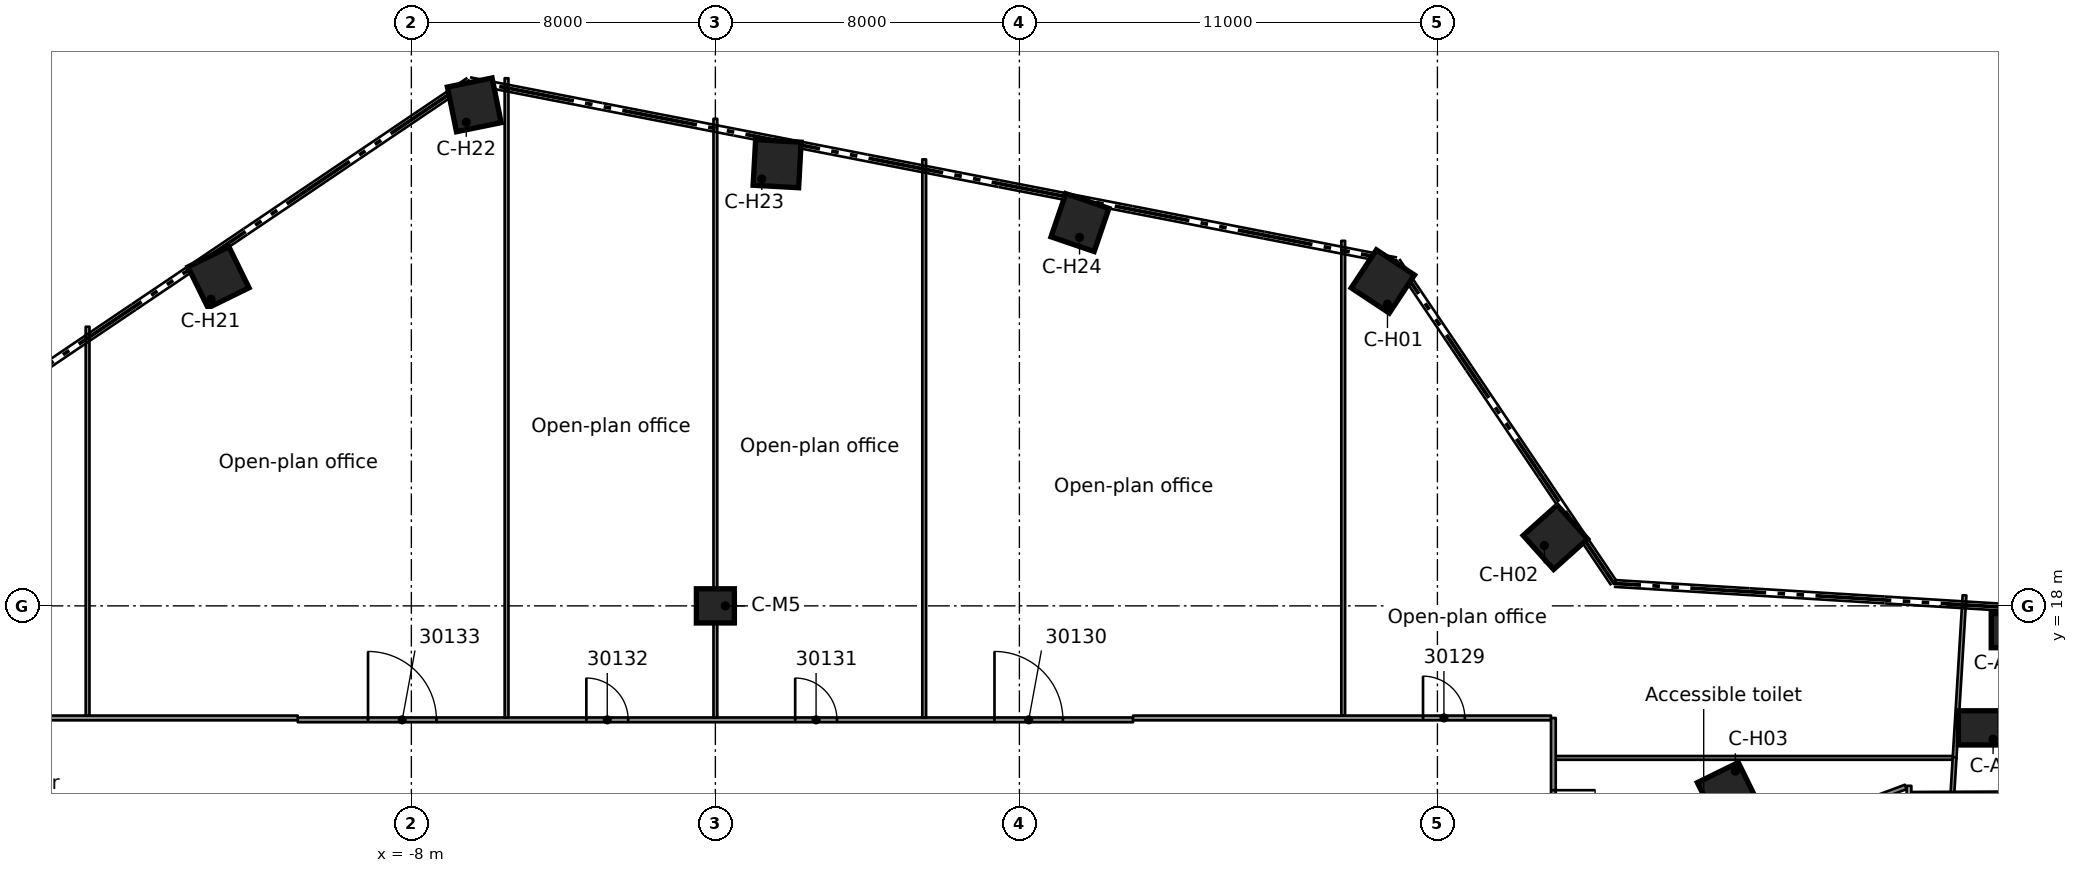
"""IFC4 building model, lengths in metres.
Left out: names, types, materials, properties, quantities, classifications, styles, units other than length and angle.
Written with IfcOpenShell. Run it as: python <this file> out.ifc"""

import sys

from ifc_helpers import new_model, si_unit, direction, frame, frame_2d, origin, origin_2d, place, context, subcontext, project, spatial, rectangle, extrude, element, fill, save


model = new_model("IFC4")
c1 = context("Model", 3, precision=1e-05, world=origin(), true_north=direction((0.0, 1.0)))
c2 = subcontext(c1, "Body", "Model", "MODEL_VIEW")
j1 = project(units=[si_unit("LENGTHUNIT", "METRE"), si_unit("PLANEANGLEUNIT", "RADIAN")], contexts=[c1])
p1 = place(None, origin())
s1 = spatial("IfcSite", under=j1, at=p1, CompositionType="ELEMENT")
p2 = place(p1, origin())
s2 = spatial("IfcBuilding", under=s1, at=p2, CompositionType="ELEMENT")
p3 = place(p2, frame((0.0, 0.0, 152.6)))
s3 = spatial("IfcBuildingStorey", under=s2, at=p3, CompositionType="ELEMENT", Elevation=152.6)
for number, where, z_axis, x_axis in (
    (1, (34.123, 17.349, 0.0), (0.0, 0.0, 1.0), (1.0, 0.0, 0.0)),
    (2, (33.258, 14.79, 0.0), (0.0, 0.0, 1.0), (1.0, 0.0, 0.0)),
):
    element("IfcColumn", number, at=place(p3, frame(where, z_axis=z_axis, x_axis=x_axis)), inside=s3, PredefinedType="COLUMN", context=c2, shape_type="SweptSolid", body=[
        extrude(rectangle(XDim=1.1, YDim=0.9, at=origin_2d()), origin(), (0.0, 0.0, 1.0), 3.5),
    ])
for number, where, z_axis, x_axis in (
    (3, (17.564, 26.536, 0.0), (0.0, 0.0, 1.0), (0.552, 0.834, 0.0)),
    (4, (22.104, 19.806, 0.0), (0.0, 0.0, 1.0), (0.745, 0.667, 0.0)),
    (5, (26.644, 13.075, 0.0), (0.0, 0.0, 1.0), (0.898, 0.441, 0.0)),
    (6, (-13.075, 26.644, 0.0), (0.0, 0.0, 1.0), (-0.441, 0.898, 0.0)),
    (7, (-6.344, 31.183, 0.0), (0.0, 0.0, 1.0), (-0.199, 0.98, 0.0)),
    (8, (1.625, 29.634, 0.0), (0.0, 0.0, 1.0), (0.055, 0.998, 0.0)),
    (9, (9.594, 28.085, 0.0), (0.0, 0.0, 1.0), (0.323, 0.946, 0.0)),
):
    element("IfcColumn", number, at=place(p3, frame(where, z_axis=z_axis, x_axis=x_axis)), inside=s3, PredefinedType="COLUMN", context=c2, shape_type="SweptSolid", body=[
        extrude(rectangle(XDim=1.2, YDim=1.2, at=origin_2d()), origin(), (0.0, 0.0, 1.0), 3.5),
    ])
p4 = place(p3, frame((0.0, 18.0, 0.0), z_axis=(0.0, 0.0, 1.0), x_axis=(1.0, 0.0, 0.0)))
e10 = element("IfcColumn", 10, at=p4, inside=s3, PredefinedType="COLUMN", context=c2, shape_type="SweptSolid", body=[
    extrude(rectangle(XDim=1.0, YDim=0.9, at=origin_2d()), origin(), (0.0, 0.0, 1.0), 3.5),
])
p5 = place(p3, frame((31.471, 13.041, 0.0), z_axis=(0.0, 0.0, 1.0), x_axis=(0.999990255084, 0.004414718129, 0.0)))
e11 = element("IfcWall", 11, at=p5, inside=s3, PredefinedType="PARTITIONING", context=c2, shape_type="SweptSolid", body=[
    extrude(rectangle(XDim=8.627, YDim=0.125, at=frame_2d((4.313, 0.0))), origin(), (0.0, 0.0, 1.0), 3.08),
])
p6 = place(p3, frame((22.113, 14.0, 0.0), z_axis=(0.0, 0.0, 1.0), x_axis=(1.0, 0.0, 0.0)))
e12 = element("IfcWall", 12, at=p6, inside=s3, PredefinedType="PARTITIONING", context=c2, shape_type="SweptSolid", body=[
    extrude(rectangle(XDim=10.446, YDim=0.1, at=frame_2d((5.223, 0.0))), origin(), (0.0, 0.0, 1.0), 3.08),
])
p7 = place(p3, frame((-10.99, 15.001, 0.0), z_axis=(0.0, 0.0, 1.0), x_axis=(1.0, 0.0, 0.0)))
e13 = element("IfcWall", 13, at=p7, inside=s3, PredefinedType="PARTITIONING", context=c2, shape_type="SweptSolid", body=[
    extrude(rectangle(XDim=21.98, YDim=0.125, at=frame_2d((10.99, 0.0))), origin(), (0.0, 0.0, 1.0), 3.08),
])
p8 = place(p7, frame((18.335, 0.0, 0.0)))
e14 = element("IfcOpeningElement", 14, at=p8, cuts=e13, PredefinedType="OPENING", context=c2, shape_type="SweptSolid", body=[
    extrude(rectangle(XDim=1.8, YDim=2.1, at=frame_2d((0.9, 1.05))), frame((0.0, 0.073, 0.0), z_axis=(0.0, -1.0, 0.0), x_axis=(1.0, 0.0, 0.0)), (0.0, 0.0, 1.0), 0.145),
])
p9 = place(p7, frame((13.09, 0.0, 0.0)))
e15 = element("IfcOpeningElement", 15, at=p9, cuts=e13, PredefinedType="OPENING", context=c2, shape_type="SweptSolid", body=[
    extrude(rectangle(XDim=1.1, YDim=2.1, at=frame_2d((0.55, 1.05))), frame((0.0, 0.073, 0.0), z_axis=(0.0, -1.0, 0.0), x_axis=(1.0, 0.0, 0.0)), (0.0, 0.0, 1.0), 0.145),
])
p10 = place(p7, frame((7.595, 0.0, 0.0)))
e16 = element("IfcOpeningElement", 16, at=p10, cuts=e13, PredefinedType="OPENING", context=c2, shape_type="SweptSolid", body=[
    extrude(rectangle(XDim=1.1, YDim=2.1, at=frame_2d((0.55, 1.05))), frame((0.0, 0.073, 0.0), z_axis=(0.0, -1.0, 0.0), x_axis=(1.0, 0.0, 0.0)), (0.0, 0.0, 1.0), 0.145),
])
p11 = place(p7, frame((1.85, 0.0, 0.0)))
e17 = element("IfcOpeningElement", 17, at=p11, cuts=e13, PredefinedType="OPENING", context=c2, shape_type="SweptSolid", body=[
    extrude(rectangle(XDim=1.8, YDim=2.1, at=frame_2d((0.9, 1.05))), frame((0.0, 0.073, 0.0), z_axis=(0.0, -1.0, 0.0), x_axis=(1.0, 0.0, 0.0)), (0.0, 0.0, 1.0), 0.145),
])
p12 = place(p3, frame((-21.988, 15.051, 0.0), z_axis=(0.0, 0.0, 1.0), x_axis=(1.0, 0.0, 0.0)))
e18 = element("IfcWall", 18, at=p12, inside=s3, PredefinedType="PARTITIONING", context=c2, shape_type="SweptSolid", body=[
    extrude(rectangle(XDim=10.997, YDim=0.125, at=frame_2d((5.499, 0.0))), origin(), (0.0, 0.0, 1.0), 3.08),
])
p13 = place(p12, frame((2.038, 0.0, 0.0)))
e19 = element("IfcOpeningElement", 19, at=p13, cuts=e18, PredefinedType="OPENING", context=c2, shape_type="SweptSolid", body=[
    extrude(rectangle(XDim=1.1, YDim=2.1, at=frame_2d((0.55, 1.05))), frame((0.0, 0.073, 0.0), z_axis=(0.0, -1.0, 0.0), x_axis=(1.0, 0.0, 0.0)), (0.0, 0.0, 1.0), 0.145),
])
p14 = place(p3, frame((10.991, 15.051, 0.0), z_axis=(0.0, 0.0, 1.0), x_axis=(1.0, 0.0, 0.0)))
e20 = element("IfcWall", 20, at=p14, inside=s3, PredefinedType="PARTITIONING", context=c2, shape_type="SweptSolid", body=[
    extrude(rectangle(XDim=10.997, YDim=0.125, at=frame_2d((5.499, 0.0))), origin(), (0.0, 0.0, 1.0), 3.08),
])
p15 = place(p14, frame((7.63, 0.0, 0.0)))
e21 = element("IfcOpeningElement", 21, at=p15, cuts=e20, PredefinedType="OPENING", context=c2, shape_type="SweptSolid", body=[
    extrude(rectangle(XDim=1.1, YDim=2.1, at=frame_2d((0.55, 1.05))), frame((0.0, 0.073, 0.0), z_axis=(0.0, -1.0, 0.0), x_axis=(1.0, 0.0, 0.0)), (0.0, 0.0, 1.0), 0.145),
])
p16 = place(p3, frame((25.742, 11.158, 0.0), z_axis=(0.0, 0.0, 1.0), x_axis=(0.937195672542, 0.348804058705, 0.0)))
e22 = element("IfcWall", 22, at=p16, inside=s3, PredefinedType="PARTITIONING", context=c2, shape_type="SweptSolid", body=[
    extrude(rectangle(XDim=5.955, YDim=0.125, at=frame_2d((2.978, 0.0))), origin(), (0.0, 0.0, 1.0), 3.08),
])
p17 = place(p3, frame((32.608, 13.985, 0.0), z_axis=(0.0, 0.0, 1.0), x_axis=(0.060978462691, 0.998139082036, 0.0)))
e23 = element("IfcWall", 23, at=p17, inside=s3, PredefinedType="PARTITIONING", context=c2, shape_type="SweptSolid", body=[
    extrude(rectangle(XDim=4.3, YDim=0.1, at=frame_2d((2.15, 0.0))), origin(), (0.0, 0.0, 1.0), 3.08),
])
p18 = place(p3, frame((32.554, 13.103, 0.0), z_axis=(0.0, 0.0, 1.0), x_axis=(0.061463226288, 0.998109348626, 0.0)))
e24 = element("IfcWall", 24, at=p18, inside=s3, PredefinedType="PARTITIONING", context=c2, shape_type="SweptSolid", body=[
    extrude(rectangle(XDim=0.914, YDim=0.1, at=frame_2d((0.457, 0.0))), origin(), (0.0, 0.0, 1.0), 3.08),
])
p19 = place(p3, frame((31.409, 13.041, 0.0), z_axis=(0.0, 0.0, 1.0), x_axis=(0.0, 1.0, 0.0)))
e25 = element("IfcWall", 25, at=p19, inside=s3, PredefinedType="PARTITIONING", context=c2, shape_type="SweptSolid", body=[
    extrude(rectangle(XDim=0.224, YDim=0.125, at=frame_2d((0.112, 0.0))), origin(), (0.0, 0.0, 1.0), 3.08),
])
p20 = place(p3, frame((22.051, 15.05, 0.0), z_axis=(0.0, 0.0, 1.0), x_axis=(0.0, -1.0, 0.0)))
e26 = element("IfcWall", 26, at=p20, inside=s3, PredefinedType="PARTITIONING", context=c2, shape_type="SweptSolid", body=[
    extrude(rectangle(XDim=3.89, YDim=0.125, at=frame_2d((1.945, 0.0))), origin(), (0.0, 0.0, 1.0), 3.08),
])
p21 = place(p20, frame((1.9, 0.0, 0.0)))
e27 = element("IfcOpeningElement", 27, at=p21, cuts=e26, PredefinedType="OPENING", context=c2, shape_type="SweptSolid", body=[
    extrude(rectangle(XDim=1.1, YDim=2.1, at=frame_2d((0.55, 1.05))), frame((0.0, 0.073, 0.0), z_axis=(0.0, -1.0, 0.0), x_axis=(1.0, 0.0, 0.0)), (0.0, 0.0, 1.0), 0.145),
])
p22 = place(p3, frame((16.521, 15.114, 0.0), z_axis=(0.0, 0.0, 1.0), x_axis=(0.0, 1.0, 0.0)))
e28 = element("IfcWall", 28, at=p22, inside=s3, PredefinedType="PARTITIONING", context=c2, shape_type="SweptSolid", body=[
    extrude(rectangle(XDim=12.491, YDim=0.1, at=frame_2d((6.246, 0.0))), origin(), (0.0, 0.0, 1.0), 3.08),
])
p23 = place(p3, frame((5.495, 15.063, 0.0), z_axis=(0.0, 0.0, 1.0), x_axis=(0.0, 1.0, 0.0)))
e29 = element("IfcWall", 29, at=p23, inside=s3, PredefinedType="PARTITIONING", context=c2, shape_type="SweptSolid", body=[
    extrude(rectangle(XDim=14.685, YDim=0.1, at=frame_2d((7.343, 0.0))), origin(), (0.0, 0.0, 1.0), 3.08),
])
p24 = place(p3, frame((0.0, 15.063, 0.0), z_axis=(0.0, 0.0, 1.0), x_axis=(0.0, 1.0, 0.0)))
e30 = element("IfcWall", 30, at=p24, inside=s3, PredefinedType="PARTITIONING", context=c2, shape_type="SweptSolid", body=[
    extrude(rectangle(XDim=15.753, YDim=0.1, at=frame_2d((7.876, 0.0))), origin(), (0.0, 0.0, 1.0), 3.08),
])
p25 = place(p3, frame((-5.495, 15.063, 0.0), z_axis=(0.0, 0.0, 1.0), x_axis=(0.0, 1.0, 0.0)))
e31 = element("IfcWall", 31, at=p25, inside=s3, PredefinedType="PARTITIONING", context=c2, shape_type="SweptSolid", body=[
    extrude(rectangle(XDim=16.821, YDim=0.1, at=frame_2d((8.411, 0.0))), origin(), (0.0, 0.0, 1.0), 3.08),
])
p26 = place(p3, frame((-16.52, 15.114, 0.0), z_axis=(0.0, 0.0, 1.0), x_axis=(0.0, 1.0, 0.0)))
e32 = element("IfcWall", 32, at=p26, inside=s3, PredefinedType="PARTITIONING", context=c2, shape_type="SweptSolid", body=[
    extrude(rectangle(XDim=10.231, YDim=0.1, at=frame_2d((5.115, 0.0))), origin(), (0.0, 0.0, 1.0), 3.08),
])
p27 = place(p21, origin())
e33 = element("IfcDoor", 33, at=p27, inside=s3, OperationType="SINGLE_SWING_RIGHT", PredefinedType="DOOR", context=c2, shape_type="SweptSolid", body=[
    extrude(rectangle(XDim=1.1, YDim=2.1, at=frame_2d((0.55, 1.05))), frame((0.0, 0.025, 0.0), z_axis=(0.0, -1.0, 0.0), x_axis=(1.0, 0.0, 0.0)), (0.0, 0.0, 1.0), 0.05),
])
fill(e27, e33)
p28 = place(p15, origin())
e34 = element("IfcDoor", 34, at=p28, inside=s3, OperationType="SINGLE_SWING_RIGHT", PredefinedType="DOOR", context=c2, shape_type="SweptSolid", body=[
    extrude(rectangle(XDim=1.1, YDim=2.1, at=frame_2d((0.55, 1.05))), frame((0.0, 0.025, 0.0), z_axis=(0.0, -1.0, 0.0), x_axis=(1.0, 0.0, 0.0)), (0.0, 0.0, 1.0), 0.05),
])
fill(e21, e34)
p29 = place(p8, origin())
e35 = element("IfcDoor", 35, at=p29, inside=s3, OperationType="DOUBLE_DOOR_SINGLE_SWING", PredefinedType="DOOR", context=c2, shape_type="SweptSolid", body=[
    extrude(rectangle(XDim=1.8, YDim=2.1, at=frame_2d((0.9, 1.05))), frame((0.0, 0.025, 0.0), z_axis=(0.0, -1.0, 0.0), x_axis=(1.0, 0.0, 0.0)), (0.0, 0.0, 1.0), 0.05),
])
fill(e14, e35)
p30 = place(p9, origin())
e36 = element("IfcDoor", 36, at=p30, inside=s3, OperationType="SINGLE_SWING_RIGHT", PredefinedType="DOOR", context=c2, shape_type="SweptSolid", body=[
    extrude(rectangle(XDim=1.1, YDim=2.1, at=frame_2d((0.55, 1.05))), frame((0.0, 0.025, 0.0), z_axis=(0.0, -1.0, 0.0), x_axis=(1.0, 0.0, 0.0)), (0.0, 0.0, 1.0), 0.05),
])
fill(e15, e36)
p31 = place(p10, origin())
e37 = element("IfcDoor", 37, at=p31, inside=s3, OperationType="SINGLE_SWING_LEFT", PredefinedType="DOOR", context=c2, shape_type="SweptSolid", body=[
    extrude(rectangle(XDim=1.1, YDim=2.1, at=frame_2d((0.55, 1.05))), frame((0.0, 0.025, 0.0), z_axis=(0.0, -1.0, 0.0), x_axis=(1.0, 0.0, 0.0)), (0.0, 0.0, 1.0), 0.05),
])
fill(e16, e37)
p32 = place(p11, origin())
e38 = element("IfcDoor", 38, at=p32, inside=s3, OperationType="DOUBLE_DOOR_SINGLE_SWING", PredefinedType="DOOR", context=c2, shape_type="SweptSolid", body=[
    extrude(rectangle(XDim=1.8, YDim=2.1, at=frame_2d((0.9, 1.05))), frame((0.0, 0.025, 0.0), z_axis=(0.0, -1.0, 0.0), x_axis=(1.0, 0.0, 0.0)), (0.0, 0.0, 1.0), 0.05),
])
fill(e17, e38)
save(model, sys.argv[1])
